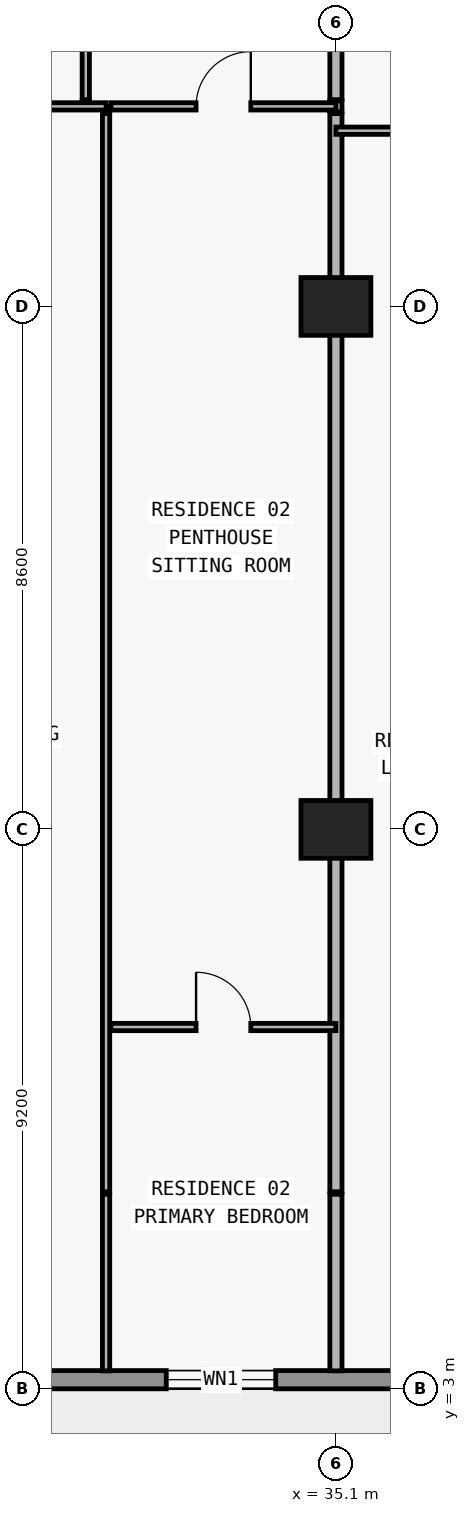
"""IFC4 building model, lengths in metres.
Left out: names, types, materials, properties, quantities, classifications, styles, units other than length and angle.
Written with IfcOpenShell. Run it as: python <this file> out.ifc"""

import sys

from ifc_helpers import new_model, si_unit, direction, frame, frame_2d, origin, origin_2d, place, context, subcontext, project, spatial, rectangle, extrude, element, fill, save


model = new_model("IFC4")
c1 = context("Model", 3, precision=1e-05, world=origin(), true_north=direction((0.0, 1.0)))
c2 = subcontext(c1, "Body", "Model", "MODEL_VIEW")
j1 = project(units=[si_unit("LENGTHUNIT", "METRE"), si_unit("PLANEANGLEUNIT", "RADIAN")], contexts=[c1])
p1 = place(None, origin())
s1 = spatial("IfcSite", under=j1, at=p1, CompositionType="ELEMENT")
p2 = place(p1, origin())
s2 = spatial("IfcBuilding", under=s1, at=p2, CompositionType="ELEMENT")
p3 = place(p2, frame((0.0, 0.0, 46.5)))
s3 = spatial("IfcBuildingStorey", under=s2, at=p3, CompositionType="ELEMENT", Elevation=46.5)
for number, where, z_axis, x_axis in (
    (1, (35.1, 12.2, 0.0), (0.0, 0.0, 1.0), (1.0, 0.0, 0.0)),
    (2, (35.1, 20.8, 0.0), (0.0, 0.0, 1.0), (1.0, 0.0, 0.0)),
):
    element("IfcColumn", number, at=place(p3, frame(where, z_axis=z_axis, x_axis=x_axis)), inside=s3, PredefinedType="COLUMN", context=c2, shape_type="SweptSolid", body=[
        extrude(rectangle(XDim=1.15, YDim=0.95, at=origin_2d()), origin(), (0.0, 0.0, 1.0), 3.05),
    ])
p4 = place(p3, frame((72.7, 3.15, 0.0), z_axis=(0.0, 0.0, 1.0), x_axis=(-1.0, 0.0, 0.0)))
e3 = element("IfcWall", 3, at=p4, inside=s3, PredefinedType="STANDARD", context=c2, shape_type="SweptSolid", body=[
    extrude(rectangle(XDim=67.6, YDim=0.3, at=frame_2d((33.8, 0.0))), origin(), (0.0, 0.0, 1.0), 3.05),
])
p5 = place(p4, frame((59.89, 0.0, 0.0)))
e4 = element("IfcOpeningElement", 4, at=p5, cuts=e3, PredefinedType="OPENING", context=c2, shape_type="SweptSolid", body=[
    extrude(rectangle(XDim=2.0, YDim=2.3, at=frame_2d((1.0, 1.15))), frame((0.0, 0.16, 0.0), z_axis=(0.0, -1.0, 0.0), x_axis=(1.0, 0.0, 0.0)), (0.0, 0.0, 1.0), 0.32),
])
p6 = place(p4, frame((55.21, 0.0, 0.65)))
e5 = element("IfcOpeningElement", 5, at=p6, cuts=e3, PredefinedType="OPENING", context=c2, shape_type="SweptSolid", body=[
    extrude(rectangle(XDim=2.6, YDim=1.85, at=frame_2d((1.3, 0.925))), frame((0.0, 0.16, 0.0), z_axis=(0.0, -1.0, 0.0), x_axis=(1.0, 0.0, 0.0)), (0.0, 0.0, 1.0), 0.32),
])
p7 = place(p4, frame((49.1, 0.0, 0.85)))
e6 = element("IfcOpeningElement", 6, at=p7, cuts=e3, PredefinedType="OPENING", context=c2, shape_type="SweptSolid", body=[
    extrude(rectangle(XDim=2.2, YDim=1.55, at=frame_2d((1.1, 0.775))), frame((0.0, 0.16, 0.0), z_axis=(0.0, -1.0, 0.0), x_axis=(1.0, 0.0, 0.0)), (0.0, 0.0, 1.0), 0.32),
])
p8 = place(p4, frame((42.69, 0.0, 0.0)))
e7 = element("IfcOpeningElement", 7, at=p8, cuts=e3, PredefinedType="OPENING", context=c2, shape_type="SweptSolid", body=[
    extrude(rectangle(XDim=2.0, YDim=2.3, at=frame_2d((1.0, 1.15))), frame((0.0, 0.16, 0.0), z_axis=(0.0, -1.0, 0.0), x_axis=(1.0, 0.0, 0.0)), (0.0, 0.0, 1.0), 0.32),
])
p9 = place(p4, frame((38.59, 0.0, 0.85)))
e8 = element("IfcOpeningElement", 8, at=p9, cuts=e3, PredefinedType="OPENING", context=c2, shape_type="SweptSolid", body=[
    extrude(rectangle(XDim=1.8, YDim=1.55, at=frame_2d((0.9, 0.775))), frame((0.0, 0.16, 0.0), z_axis=(0.0, -1.0, 0.0), x_axis=(1.0, 0.0, 0.0)), (0.0, 0.0, 1.0), 0.32),
])
p10 = place(p4, frame((30.914, 0.0, 0.85)))
e9 = element("IfcOpeningElement", 9, at=p10, cuts=e3, PredefinedType="OPENING", context=c2, shape_type="SweptSolid", body=[
    extrude(rectangle(XDim=2.2, YDim=1.55, at=frame_2d((1.1, 0.775))), frame((0.0, 0.16, 0.0), z_axis=(0.0, -1.0, 0.0), x_axis=(1.0, 0.0, 0.0)), (0.0, 0.0, 1.0), 0.32),
])
p11 = place(p4, frame((26.69, 0.0, 0.0)))
e10 = element("IfcOpeningElement", 10, at=p11, cuts=e3, PredefinedType="OPENING", context=c2, shape_type="SweptSolid", body=[
    extrude(rectangle(XDim=2.0, YDim=2.3, at=frame_2d((1.0, 1.15))), frame((0.0, 0.16, 0.0), z_axis=(0.0, -1.0, 0.0), x_axis=(1.0, 0.0, 0.0)), (0.0, 0.0, 1.0), 0.32),
])
p12 = place(p4, frame((22.59, 0.0, 0.85)))
e11 = element("IfcOpeningElement", 11, at=p12, cuts=e3, PredefinedType="OPENING", context=c2, shape_type="SweptSolid", body=[
    extrude(rectangle(XDim=1.8, YDim=1.55, at=frame_2d((0.9, 0.775))), frame((0.0, 0.16, 0.0), z_axis=(0.0, -1.0, 0.0), x_axis=(1.0, 0.0, 0.0)), (0.0, 0.0, 1.0), 0.32),
])
p13 = place(p4, frame((18.69, 0.0, 0.0)))
e12 = element("IfcOpeningElement", 12, at=p13, cuts=e3, PredefinedType="OPENING", context=c2, shape_type="SweptSolid", body=[
    extrude(rectangle(XDim=2.0, YDim=2.3, at=frame_2d((1.0, 1.15))), frame((0.0, 0.16, 0.0), z_axis=(0.0, -1.0, 0.0), x_axis=(1.0, 0.0, 0.0)), (0.0, 0.0, 1.0), 0.32),
])
p14 = place(p4, frame((14.01, 0.0, 0.65)))
e13 = element("IfcOpeningElement", 13, at=p14, cuts=e3, PredefinedType="OPENING", context=c2, shape_type="SweptSolid", body=[
    extrude(rectangle(XDim=2.6, YDim=1.85, at=frame_2d((1.3, 0.925))), frame((0.0, 0.16, 0.0), z_axis=(0.0, -1.0, 0.0), x_axis=(1.0, 0.0, 0.0)), (0.0, 0.0, 1.0), 0.32),
])
p15 = place(p4, frame((7.9, 0.0, 0.85)))
e14 = element("IfcOpeningElement", 14, at=p15, cuts=e3, PredefinedType="OPENING", context=c2, shape_type="SweptSolid", body=[
    extrude(rectangle(XDim=2.2, YDim=1.55, at=frame_2d((1.1, 0.775))), frame((0.0, 0.16, 0.0), z_axis=(0.0, -1.0, 0.0), x_axis=(1.0, 0.0, 0.0)), (0.0, 0.0, 1.0), 0.32),
])
p16 = place(p3, frame((30.986, 24.09, 0.0), z_axis=(0.0, 0.0, 1.0), x_axis=(0.0, 1.0, 0.0)))
e15 = element("IfcWall", 15, at=p16, inside=s3, PredefinedType="PARTITIONING", context=c2, shape_type="SweptSolid", body=[
    extrude(rectangle(XDim=0.09, YDim=0.12, at=frame_2d((0.045, 0.0))), origin(), (0.0, 0.0, 1.0), 3.05),
])
p17 = place(p3, frame((30.986, 24.2, 0.0), z_axis=(0.0, 0.0, 1.0), x_axis=(0.0, 1.0, 0.0)))
e16 = element("IfcWall", 16, at=p17, inside=s3, PredefinedType="PARTITIONING", context=c2, shape_type="SweptSolid", body=[
    extrude(rectangle(XDim=4.38, YDim=0.12, at=frame_2d((2.19, 0.0))), origin(), (0.0, 0.0, 1.0), 3.05),
])
p18 = place(p17, frame((1.74, 0.0, 0.0)))
e17 = element("IfcOpeningElement", 17, at=p18, cuts=e16, PredefinedType="OPENING", context=c2, shape_type="SweptSolid", body=[
    extrude(rectangle(XDim=0.9, YDim=2.15, at=frame_2d((0.45, 1.075))), frame((0.0, 0.07, 0.0), z_axis=(0.0, -1.0, 0.0), x_axis=(1.0, 0.0, 0.0)), (0.0, 0.0, 1.0), 0.14),
])
p19 = place(p3, frame((31.32, 3.295, 0.0), z_axis=(0.0, 0.0, 1.0), x_axis=(0.0, 1.0, 0.0)))
e18 = element("IfcWall", 18, at=p19, inside=s3, PredefinedType="PARTITIONING", context=c2, shape_type="SweptSolid", body=[
    extrude(rectangle(XDim=2.905, YDim=0.12, at=frame_2d((1.453, 0.0))), origin(), (0.0, 0.0, 1.0), 3.05),
])
p20 = place(p3, frame((31.32, 6.24, 0.0), z_axis=(0.0, 0.0, 1.0), x_axis=(0.0, 1.0, 0.0)))
e19 = element("IfcWall", 19, at=p20, inside=s3, PredefinedType="PARTITIONING", context=c2, shape_type="SweptSolid", body=[
    extrude(rectangle(XDim=17.73, YDim=0.12, at=frame_2d((8.865, 0.0))), origin(), (0.0, 0.0, 1.0), 3.05),
])
p21 = place(p3, frame((31.32, 24.0, 0.0), z_axis=(0.0, 0.0, 1.0), x_axis=(0.0, 1.0, 0.0)))
e20 = element("IfcWall", 20, at=p21, inside=s3, PredefinedType="PARTITIONING", context=c2, shape_type="SweptSolid", body=[
    extrude(rectangle(XDim=0.09, YDim=0.12, at=frame_2d((0.045, 0.0))), origin(), (0.0, 0.0, 1.0), 3.05),
])
p22 = place(p3, frame((35.1, 3.295, 0.0), z_axis=(0.0, 0.0, 1.0), x_axis=(0.0, 1.0, 0.0)))
e21 = element("IfcWall", 21, at=p22, inside=s3, PredefinedType="PARTITIONING", context=c2, shape_type="SweptSolid", body=[
    extrude(rectangle(XDim=2.905, YDim=0.2, at=frame_2d((1.453, 0.0))), origin(), (0.0, 0.0, 1.0), 3.05),
])
p23 = place(p3, frame((35.1, 6.24, 0.0), z_axis=(0.0, 0.0, 1.0), x_axis=(0.0, 1.0, 0.0)))
e22 = element("IfcWall", 22, at=p23, inside=s3, PredefinedType="PARTITIONING", context=c2, shape_type="SweptSolid", body=[
    extrude(rectangle(XDim=17.73, YDim=0.2, at=frame_2d((8.865, 0.0))), origin(), (0.0, 0.0, 1.0), 2.11),
])
p24 = place(p3, frame((35.1, 24.0, 0.0), z_axis=(0.0, 0.0, 1.0), x_axis=(0.0, 1.0, 0.0)))
e23 = element("IfcWall", 23, at=p24, inside=s3, PredefinedType="PARTITIONING", context=c2, shape_type="SweptSolid", body=[
    extrude(rectangle(XDim=0.18, YDim=0.2, at=frame_2d((0.09, 0.0))), origin(), (0.0, 0.0, 1.0), 2.11),
])
p25 = place(p3, frame((35.1, 24.2, 0.0), z_axis=(0.0, 0.0, 1.0), x_axis=(0.0, 1.0, 0.0)))
e24 = element("IfcWall", 24, at=p25, inside=s3, PredefinedType="PARTITIONING", context=c2, shape_type="SweptSolid", body=[
    extrude(rectangle(XDim=4.38, YDim=0.2, at=frame_2d((2.19, 0.0))), origin(), (0.0, 0.0, 1.0), 2.11),
])
p26 = place(p3, frame((31.4, 8.95, 0.0), z_axis=(0.0, 0.0, 1.0), x_axis=(1.0, 0.0, 0.0)))
e25 = element("IfcWall", 25, at=p26, inside=s3, PredefinedType="PARTITIONING", context=c2, shape_type="SweptSolid", body=[
    extrude(rectangle(XDim=3.7, YDim=0.12, at=frame_2d((1.85, 0.0))), origin(), (0.0, 0.0, 1.0), 3.05),
])
p27 = place(p26, frame((1.4, 0.0, 0.0)))
e26 = element("IfcOpeningElement", 26, at=p27, cuts=e25, PredefinedType="OPENING", context=c2, shape_type="SweptSolid", body=[
    extrude(rectangle(XDim=0.9, YDim=2.15, at=frame_2d((0.45, 1.075))), frame((0.0, 0.07, 0.0), z_axis=(0.0, -1.0, 0.0), x_axis=(1.0, 0.0, 0.0)), (0.0, 0.0, 1.0), 0.14),
])
p28 = place(p3, frame((35.1, 23.69, 0.0), z_axis=(0.0, 0.0, 1.0), x_axis=(1.0, 0.0, 0.0)))
e27 = element("IfcWall", 27, at=p28, inside=s3, PredefinedType="PARTITIONING", context=c2, shape_type="SweptSolid", body=[
    extrude(rectangle(XDim=7.6, YDim=0.12, at=frame_2d((3.8, 0.0))), origin(), (0.0, 0.0, 1.0), 3.05),
])
p29 = place(p28, frame((1.336, 0.0, 0.0)))
e28 = element("IfcOpeningElement", 28, at=p29, cuts=e27, PredefinedType="OPENING", context=c2, shape_type="SweptSolid", body=[
    extrude(rectangle(XDim=0.9, YDim=2.15, at=frame_2d((0.45, 1.075))), frame((0.0, 0.07, 0.0), z_axis=(0.0, -1.0, 0.0), x_axis=(1.0, 0.0, 0.0)), (0.0, 0.0, 1.0), 0.14),
])
p30 = place(p28, frame((5.402, 0.0, 0.0)))
e29 = element("IfcOpeningElement", 29, at=p30, cuts=e27, PredefinedType="OPENING", context=c2, shape_type="SweptSolid", body=[
    extrude(rectangle(XDim=0.9, YDim=2.15, at=frame_2d((0.45, 1.075))), frame((0.0, 0.07, 0.0), z_axis=(0.0, -1.0, 0.0), x_axis=(1.0, 0.0, 0.0)), (0.0, 0.0, 1.0), 0.14),
])
p31 = place(p3, frame((26.97, 24.09, 0.0), z_axis=(0.0, 0.0, 1.0), x_axis=(1.0, 0.0, 0.0)))
e30 = element("IfcWall", 30, at=p31, inside=s3, PredefinedType="PARTITIONING", context=c2, shape_type="SweptSolid", body=[
    extrude(rectangle(XDim=4.35, YDim=0.12, at=frame_2d((2.175, 0.0))), origin(), (0.0, 0.0, 1.0), 3.05),
])
p32 = place(p31, frame((1.558, 0.0, 0.0)))
e31 = element("IfcOpeningElement", 31, at=p32, cuts=e30, PredefinedType="OPENING", context=c2, shape_type="SweptSolid", body=[
    extrude(rectangle(XDim=0.9, YDim=2.15, at=frame_2d((0.45, 1.075))), frame((0.0, 0.07, 0.0), z_axis=(0.0, -1.0, 0.0), x_axis=(1.0, 0.0, 0.0)), (0.0, 0.0, 1.0), 0.14),
])
p33 = place(p3, frame((31.4, 24.09, 0.0), z_axis=(0.0, 0.0, 1.0), x_axis=(1.0, 0.0, 0.0)))
e32 = element("IfcWall", 32, at=p33, inside=s3, PredefinedType="PARTITIONING", context=c2, shape_type="SweptSolid", body=[
    extrude(rectangle(XDim=3.7, YDim=0.12, at=frame_2d((1.85, 0.0))), origin(), (0.0, 0.0, 1.0), 3.05),
])
p34 = place(p33, frame((1.4, 0.0, 0.0)))
e33 = element("IfcOpeningElement", 33, at=p34, cuts=e32, PredefinedType="OPENING", context=c2, shape_type="SweptSolid", body=[
    extrude(rectangle(XDim=0.9, YDim=2.15, at=frame_2d((0.45, 1.075))), frame((0.0, 0.07, 0.0), z_axis=(0.0, -1.0, 0.0), x_axis=(1.0, 0.0, 0.0)), (0.0, 0.0, 1.0), 0.14),
])
p35 = place(p9, origin())
e34 = element("IfcWindow", 34, at=p35, inside=s3, PartitioningType="SINGLE_PANEL", PredefinedType="WINDOW", context=c2, shape_type="SweptSolid", body=[
    extrude(rectangle(XDim=1.8, YDim=1.55, at=frame_2d((0.9, 0.775))), frame((0.0, 0.03, 0.0), z_axis=(0.0, -1.0, 0.0), x_axis=(1.0, 0.0, 0.0)), (0.0, 0.0, 1.0), 0.06),
])
fill(e8, e34)
p36 = place(p34, origin())
e35 = element("IfcDoor", 35, at=p36, inside=s3, OperationType="SINGLE_SWING_RIGHT", PredefinedType="DOOR", context=c2, shape_type="SweptSolid", body=[
    extrude(rectangle(XDim=0.9, YDim=2.15, at=frame_2d((0.45, 1.075))), frame((0.0, 0.025, 0.0), z_axis=(0.0, -1.0, 0.0), x_axis=(1.0, 0.0, 0.0)), (0.0, 0.0, 1.0), 0.05),
])
fill(e33, e35)
p37 = place(p27, origin())
e36 = element("IfcDoor", 36, at=p37, inside=s3, OperationType="SINGLE_SWING_LEFT", PredefinedType="DOOR", context=c2, shape_type="SweptSolid", body=[
    extrude(rectangle(XDim=0.9, YDim=2.15, at=frame_2d((0.45, 1.075))), frame((0.0, 0.025, 0.0), z_axis=(0.0, -1.0, 0.0), x_axis=(1.0, 0.0, 0.0)), (0.0, 0.0, 1.0), 0.05),
])
fill(e26, e36)
save(model, sys.argv[1])
